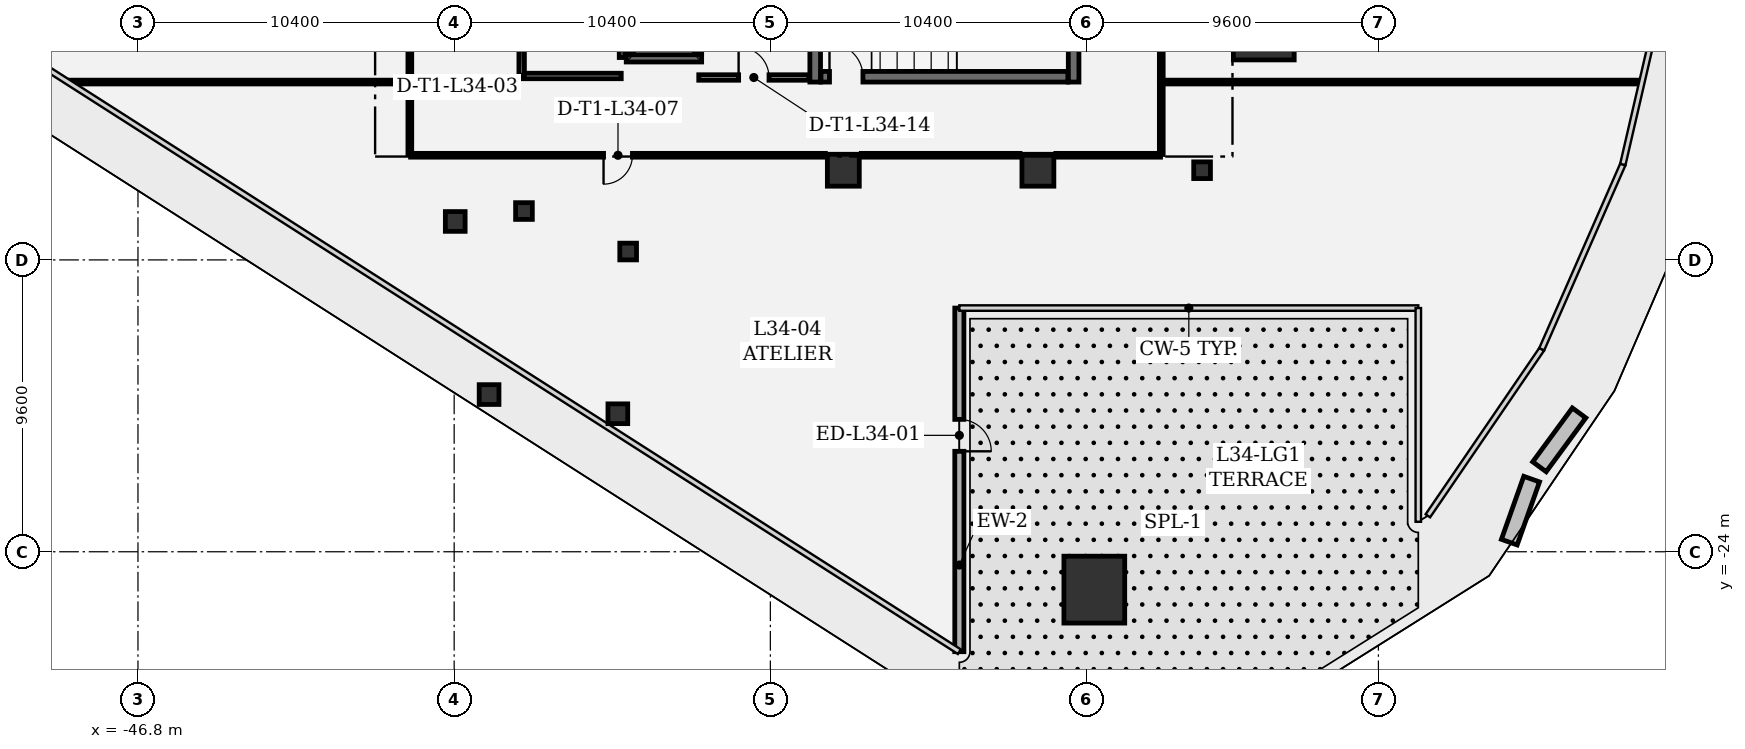
"""IFC4 building model, lengths in metres.
Left out: names, types, materials, properties, quantities, classifications, styles, units other than length and angle.
Written with IfcOpenShell. Run it as: python <this file> out.ifc"""

import sys

from ifc_helpers import new_model, si_unit, direction, frame, frame_2d, origin, origin_2d, place, context, subcontext, project, spatial, rectangle, extrude, element, fill, save


model = new_model("IFC4")
c1 = context("Model", 3, precision=1e-05, world=origin(), true_north=direction((0.0, 1.0)))
c2 = subcontext(c1, "Body", "Model", "MODEL_VIEW")
j1 = project(units=[si_unit("LENGTHUNIT", "METRE"), si_unit("PLANEANGLEUNIT", "RADIAN")], contexts=[c1])
p1 = place(None, origin())
s1 = spatial("IfcSite", under=j1, at=p1, CompositionType="ELEMENT")
p2 = place(p1, origin())
s2 = spatial("IfcBuilding", under=s1, at=p2, CompositionType="ELEMENT")
p3 = place(p2, frame((0.0, 0.0, 150.3)))
s3 = spatial("IfcBuildingStorey", under=s2, at=p3, CompositionType="ELEMENT", Elevation=150.3)
for number, where, z_axis, x_axis in (
    (1, (-15.344, -25.246, 0.0), (0.0, 0.0, 1.0), (1.0, 0.0, 0.0)),
    (2, (-9.77, -6.721, 0.0), (0.0, 0.0, 1.0), (1.0, 0.0, 0.0)),
):
    element("IfcColumn", number, at=place(p3, frame(where, z_axis=z_axis, x_axis=x_axis)), inside=s3, PredefinedType="COLUMN", context=c2, shape_type="SweptSolid", body=[
        extrude(rectangle(XDim=2.0, YDim=2.2, at=origin_2d()), origin(), (0.0, 0.0, 1.0), 4.05),
    ])
for number, where, z_axis, x_axis in (
    (3, (-17.2, -11.45, 0.0), (0.0, 0.0, 1.0), (1.0, 0.0, 0.0)),
    (4, (-23.6, -11.45, 0.0), (0.0, 0.0, 1.0), (1.0, 0.0, 0.0)),
):
    element("IfcColumn", number, at=place(p3, frame(where, z_axis=z_axis, x_axis=x_axis)), inside=s3, PredefinedType="COLUMN", context=c2, shape_type="SweptSolid", body=[
        extrude(rectangle(XDim=1.05, YDim=1.05, at=origin_2d()), origin(), (0.0, 0.0, 1.0), 4.05),
    ])
for number, where, z_axis, x_axis in (
    (5, (-35.252, -18.829, 0.0), (0.0, 0.0, 1.0), (1.0, 0.0, 0.0)),
    (6, (-31.016, -19.46, 0.0), (0.0, 0.0, 1.0), (1.0, 0.0, 0.0)),
    (7, (-36.365, -13.135, 0.0), (0.0, 0.0, 1.0), (1.0, 0.0, 0.0)),
):
    element("IfcColumn", number, at=place(p3, frame(where, z_axis=z_axis, x_axis=x_axis)), inside=s3, PredefinedType="COLUMN", context=c2, shape_type="SweptSolid", body=[
        extrude(rectangle(XDim=0.65, YDim=0.65, at=origin_2d()), origin(), (0.0, 0.0, 1.0), 4.05),
    ])
for number, where, z_axis, x_axis in (
    (8, (-34.104, -12.792, 0.0), (0.0, 0.0, 1.0), (1.0, 0.0, 0.0)),
    (9, (-30.677, -14.124, 0.0), (0.0, 0.0, 1.0), (1.0, 0.0, 0.0)),
    (10, (-11.8, -11.45, 0.0), (0.0, 0.0, 1.0), (1.0, 0.0, 0.0)),
):
    element("IfcColumn", number, at=place(p3, frame(where, z_axis=z_axis, x_axis=x_axis)), inside=s3, PredefinedType="COLUMN", context=c2, shape_type="SweptSolid", body=[
        extrude(rectangle(XDim=0.55, YDim=0.55, at=origin_2d()), origin(), (0.0, 0.0, 1.0), 4.05),
    ])
p4 = place(p3, frame((-19.784, -15.984, 0.0), z_axis=(0.0, 0.0, 1.0), x_axis=(0.0, -1.0, 0.0)))
e11 = element("IfcWall", 11, at=p4, inside=s3, PredefinedType="SOLIDWALL", context=c2, shape_type="SweptSolid", body=[
    extrude(rectangle(XDim=11.303, YDim=0.3, at=frame_2d((5.652, 0.0))), origin(), (0.0, 0.0, 1.0), 2.895),
])
p5 = place(p4, frame((3.662, 0.0, 0.0)))
e12 = element("IfcOpeningElement", 12, at=p5, cuts=e11, PredefinedType="OPENING", context=c2, shape_type="SweptSolid", body=[
    extrude(rectangle(XDim=1.05, YDim=2.2, at=frame_2d((0.525, 1.1))), frame((0.0, 0.16, 0.0), z_axis=(0.0, -1.0, 0.0), x_axis=(1.0, 0.0, 0.0)), (0.0, 0.0, 1.0), 0.32),
])
for number, where, z_axis, x_axis in (
    (13, (-24.525, -4.34, 0.0), (0.0, 0.0, 1.0), (0.0, -1.0, 0.0)),
    (14, (-16.025, -8.55, 0.0), (0.0, 0.0, 1.0), (0.0, 1.0, 0.0)),
):
    element("IfcWall", number, at=place(p3, frame(where, z_axis=z_axis, x_axis=x_axis)), inside=s3, PredefinedType="SHEAR", context=c2, shape_type="SweptSolid", body=[
        extrude(rectangle(XDim=4.21, YDim=0.35, at=frame_2d((2.105, 0.0))), origin(), (0.0, 0.0, 1.0), 3.78),
    ])
p6 = place(p3, frame((-24.335, -8.375, 0.0), z_axis=(0.0, 0.0, 1.0), x_axis=(1.0, 0.0, 0.0)))
e15 = element("IfcWall", 15, at=p6, inside=s3, PredefinedType="SHEAR", context=c2, shape_type="SweptSolid", body=[
    extrude(rectangle(XDim=8.12, YDim=0.35, at=frame_2d((4.06, 0.0))), origin(), (0.0, 0.0, 1.0), 3.78),
])
p7 = place(p6, frame((0.28, 0.0, 0.0)))
e16 = element("IfcOpeningElement", 16, at=p7, cuts=e15, PredefinedType="OPENING", context=c2, shape_type="SweptSolid", body=[
    extrude(rectangle(XDim=1.1, YDim=2.2, at=frame_2d((0.55, 1.1))), frame((0.0, 0.185, 0.0), z_axis=(0.0, -1.0, 0.0), x_axis=(1.0, 0.0, 0.0)), (0.0, 0.0, 1.0), 0.37),
])
p8 = place(p3, frame((-28.26, -7.77, 0.0), z_axis=(0.0, 0.0, 1.0), x_axis=(-1.0, 0.0, 0.0)))
e17 = element("IfcWall", 17, at=p8, inside=s3, PredefinedType="SHEAR", context=c2, shape_type="SweptSolid", body=[
    extrude(rectangle(XDim=2.48, YDim=0.24, at=frame_2d((1.24, 0.0))), origin(), (0.0, 0.0, 1.0), 3.78),
])
p9 = place(p3, frame((-30.62, -7.638, 0.0), z_axis=(0.0, 0.0, 1.0), x_axis=(0.0, 1.0, 0.0)))
e18 = element("IfcWall", 18, at=p9, inside=s3, PredefinedType="SHEAR", context=c2, shape_type="SweptSolid", body=[
    extrude(rectangle(XDim=2.376, YDim=0.24, at=frame_2d((1.188, 0.0))), origin(), (0.0, 0.0, 1.0), 3.78),
])
p10 = place(p3, frame((-28.38, -5.262, 0.0), z_axis=(0.0, 0.0, 1.0), x_axis=(0.0, -1.0, 0.0)))
e19 = element("IfcWall", 19, at=p10, inside=s3, PredefinedType="SHEAR", context=c2, shape_type="SweptSolid", body=[
    extrude(rectangle(XDim=2.376, YDim=0.24, at=frame_2d((1.188, 0.0))), origin(), (0.0, 0.0, 1.0), 3.78),
])
p11 = place(p10, frame((0.538, 0.0, 0.0)))
e20 = element("IfcOpeningElement", 20, at=p11, cuts=e19, PredefinedType="OPENING", context=c2, shape_type="SweptSolid", body=[
    extrude(rectangle(XDim=1.3, YDim=2.3, at=frame_2d((0.65, 1.15))), frame((0.0, 0.13, 0.0), z_axis=(0.0, -1.0, 0.0), x_axis=(1.0, 0.0, 0.0)), (0.0, 0.0, 1.0), 0.26),
])
p12 = place(p3, frame((-28.355, -8.4, 0.0), z_axis=(0.0, 0.0, 1.0), x_axis=(1.0, 0.0, 0.0)))
e21 = element("IfcWall", 21, at=p12, inside=s3, PredefinedType="PARTITIONING", context=c2, shape_type="SweptSolid", body=[
    extrude(rectangle(XDim=3.622, YDim=0.18, at=frame_2d((1.811, 0.0))), origin(), (0.0, 0.0, 1.0), 3.78),
])
p13 = place(p12, frame((1.311, 0.0, 0.0)))
e22 = element("IfcOpeningElement", 22, at=p13, cuts=e21, PredefinedType="OPENING", context=c2, shape_type="SweptSolid", body=[
    extrude(rectangle(XDim=1.0, YDim=2.15, at=frame_2d((0.5, 1.075))), frame((0.0, 0.1, 0.0), z_axis=(0.0, -1.0, 0.0), x_axis=(1.0, 0.0, 0.0)), (0.0, 0.0, 1.0), 0.2),
])
p14 = place(p3, frame((-34.155, -8.35, 0.0), z_axis=(0.0, 0.0, 1.0), x_axis=(1.0, 0.0, 0.0)))
e23 = element("IfcWall", 23, at=p14, inside=s3, PredefinedType="PARTITIONING", context=c2, shape_type="SweptSolid", body=[
    extrude(rectangle(XDim=3.25, YDim=0.18, at=frame_2d((1.625, 0.0))), origin(), (0.0, 0.0, 1.0), 3.78),
])
p15 = place(p3, frame((-30.88, -7.743, 0.0), z_axis=(0.0, 0.0, 1.0), x_axis=(0.0, 1.0, 0.0)))
e24 = element("IfcWall", 24, at=p15, inside=s3, PredefinedType="PARTITIONING", context=c2, shape_type="SweptSolid", body=[
    extrude(rectangle(XDim=2.003, YDim=0.18, at=frame_2d((1.001, 0.0))), origin(), (0.0, 0.0, 1.0), 3.78),
])
p16 = place(p3, frame((-34.18, -4.84, 0.0), z_axis=(0.0, 0.0, 1.0), x_axis=(0.0, -1.0, 0.0)))
e25 = element("IfcWall", 25, at=p16, inside=s3, PredefinedType="PARTITIONING", context=c2, shape_type="SweptSolid", body=[
    extrude(rectangle(XDim=3.485, YDim=0.18, at=frame_2d((1.743, 0.0))), origin(), (0.0, 0.0, 1.0), 3.78),
])
p17 = place(p16, frame((1.302, 0.0, 0.0)))
e26 = element("IfcOpeningElement", 26, at=p17, cuts=e25, PredefinedType="OPENING", context=c2, shape_type="SweptSolid", body=[
    extrude(rectangle(XDim=0.88, YDim=2.1, at=frame_2d((0.44, 1.05))), frame((0.0, 0.1, 0.0), z_axis=(0.0, -1.0, 0.0), x_axis=(1.0, 0.0, 0.0)), (0.0, 0.0, 1.0), 0.2),
])
p18 = place(p3, frame((2.587, -8.55, 0.0), z_axis=(0.0, 0.0, 1.0), x_axis=(-1.0, 0.0, 0.0)))
e27 = element("IfcWall", 27, at=p18, inside=s3, PredefinedType="PARTITIONING", context=c2, shape_type="SweptSolid", body=[
    extrude(rectangle(XDim=15.704, YDim=0.125, at=frame_2d((7.852, 0.0))), origin(), (0.0, 0.0, 1.0), 2.895),
])
p19 = place(p3, frame((-13.142, -10.933, 0.0), z_axis=(0.0, 0.0, 1.0), x_axis=(0.0, 1.0, 0.0)))
e28 = element("IfcWall", 28, at=p19, inside=s3, PredefinedType="PARTITIONING", context=c2, shape_type="SweptSolid", body=[
    extrude(rectangle(XDim=2.358, YDim=0.125, at=frame_2d((1.179, 0.0))), origin(), (0.0, 0.0, 1.0), 3.78),
])
p20 = place(p3, frame((-13.167, -10.958, 0.0), z_axis=(0.0, 0.0, 1.0), x_axis=(-1.0, 0.0, 0.0)))
e29 = element("IfcWall", 29, at=p20, inside=s3, PredefinedType="PARTITIONING", context=c2, shape_type="SweptSolid", body=[
    extrude(rectangle(XDim=3.443, YDim=0.125, at=frame_2d((1.722, 0.0))), origin(), (0.0, 0.0, 1.0), 2.895),
])
p21 = place(p3, frame((-17.79, -10.958, 0.0), z_axis=(0.0, 0.0, 1.0), x_axis=(-1.0, 0.0, 0.0)))
e30 = element("IfcWall", 30, at=p21, inside=s3, PredefinedType="PARTITIONING", context=c2, shape_type="SweptSolid", body=[
    extrude(rectangle(XDim=5.22, YDim=0.125, at=frame_2d((2.61, 0.0))), origin(), (0.0, 0.0, 1.0), 3.78),
])
p22 = place(p3, frame((-24.19, -10.958, 0.0), z_axis=(0.0, 0.0, 1.0), x_axis=(-1.0, 0.0, 0.0)))
e31 = element("IfcWall", 31, at=p22, inside=s3, PredefinedType="PARTITIONING", context=c2, shape_type="SweptSolid", body=[
    extrude(rectangle(XDim=13.643, YDim=0.125, at=frame_2d((6.822, 0.0))), origin(), (0.0, 0.0, 1.0), 3.344),
])
p23 = place(p22, frame((6.346, 0.0, 0.0)))
e32 = element("IfcOpeningElement", 32, at=p23, cuts=e31, PredefinedType="OPENING", context=c2, shape_type="SweptSolid", body=[
    extrude(rectangle(XDim=0.95, YDim=2.15, at=frame_2d((0.475, 1.075))), frame((0.0, 0.073, 0.0), z_axis=(0.0, -1.0, 0.0), x_axis=(1.0, 0.0, 0.0)), (0.0, 0.0, 1.0), 0.145),
])
p24 = place(p3, frame((-37.858, -8.575, 0.0), z_axis=(0.0, 0.0, 1.0), x_axis=(0.0, -1.0, 0.0)))
e33 = element("IfcWall", 33, at=p24, inside=s3, PredefinedType="PARTITIONING", context=c2, shape_type="SweptSolid", body=[
    extrude(rectangle(XDim=2.358, YDim=0.125, at=frame_2d((1.179, 0.0))), origin(), (0.0, 0.0, 1.0), 3.78),
])
p25 = place(p3, frame((-37.883, -8.55, 0.0), z_axis=(0.0, 0.0, 1.0), x_axis=(-1.0, 0.0, 0.0)))
e34 = element("IfcWall", 34, at=p25, inside=s3, PredefinedType="PARTITIONING", context=c2, shape_type="SweptSolid", body=[
    extrude(rectangle(XDim=11.137, YDim=0.125, at=frame_2d((5.569, 0.0))), origin(), (0.0, 0.0, 1.0), 2.9),
])
p26 = place(p3, frame((-13.142, -3.644, 0.0), z_axis=(0.0, 0.0, 1.0), x_axis=(0.0, -1.0, 0.0)))
e35 = element("IfcWall", 35, at=p26, inside=s3, PredefinedType="PARTITIONING", context=c2, shape_type="SweptSolid", body=[
    extrude(rectangle(XDim=4.873, YDim=0.125, at=frame_2d((2.437, 0.0))), origin(), (0.0, 0.0, 1.0), 3.78),
])
p27 = place(p26, frame((1.962, 0.0, 0.0)))
e36 = element("IfcOpeningElement", 36, at=p27, cuts=e35, PredefinedType="OPENING", context=c2, shape_type="SweptSolid", body=[
    extrude(rectangle(XDim=0.95, YDim=2.15, at=frame_2d((0.475, 1.075))), frame((0.0, 0.073, 0.0), z_axis=(0.0, -1.0, 0.0), x_axis=(1.0, 0.0, 0.0)), (0.0, 0.0, 1.0), 0.145),
])
p28 = place(p3, frame((-37.858, -8.517, 0.0), z_axis=(0.0, 0.0, 1.0), x_axis=(0.0, 1.0, 0.0)))
e37 = element("IfcWall", 37, at=p28, inside=s3, PredefinedType="PARTITIONING", context=c2, shape_type="SweptSolid", body=[
    extrude(rectangle(XDim=3.734, YDim=0.125, at=frame_2d((1.867, 0.0))), origin(), (0.0, 0.0, 1.0), 3.78),
])
p29 = place(p28, frame((1.392, 0.0, 0.0)))
e38 = element("IfcOpeningElement", 38, at=p29, cuts=e37, PredefinedType="OPENING", context=c2, shape_type="SweptSolid", body=[
    extrude(rectangle(XDim=0.95, YDim=2.15, at=frame_2d((0.475, 1.075))), frame((0.0, 0.073, 0.0), z_axis=(0.0, -1.0, 0.0), x_axis=(1.0, 0.0, 0.0)), (0.0, 0.0, 1.0), 0.145),
])
p30 = place(p5, origin())
e39 = element("IfcDoor", 39, at=p30, inside=s3, OperationType="SINGLE_SWING_RIGHT", PredefinedType="DOOR", context=c2, shape_type="SweptSolid", body=[
    extrude(rectangle(XDim=1.05, YDim=2.2, at=frame_2d((0.525, 1.1))), frame((0.0, 0.025, 0.0), z_axis=(0.0, -1.0, 0.0), x_axis=(1.0, 0.0, 0.0)), (0.0, 0.0, 1.0), 0.05),
])
fill(e12, e39)
p31 = place(p7, origin())
e40 = element("IfcDoor", 40, at=p31, inside=s3, OperationType="SINGLE_SWING_LEFT", PredefinedType="DOOR", context=c2, shape_type="SweptSolid", body=[
    extrude(rectangle(XDim=1.1, YDim=2.2, at=frame_2d((0.55, 1.1))), frame((0.0, 0.025, 0.0), z_axis=(0.0, -1.0, 0.0), x_axis=(1.0, 0.0, 0.0)), (0.0, 0.0, 1.0), 0.05),
])
fill(e16, e40)
p32 = place(p23, origin())
e41 = element("IfcDoor", 41, at=p32, inside=s3, OperationType="SINGLE_SWING_RIGHT", PredefinedType="DOOR", context=c2, shape_type="SweptSolid", body=[
    extrude(rectangle(XDim=0.95, YDim=2.15, at=frame_2d((0.475, 1.075))), frame((0.0, 0.025, 0.0), z_axis=(0.0, -1.0, 0.0), x_axis=(1.0, 0.0, 0.0)), (0.0, 0.0, 1.0), 0.05),
])
fill(e32, e41)
p33 = place(p13, origin())
e42 = element("IfcDoor", 42, at=p33, inside=s3, OperationType="SINGLE_SWING_LEFT", PredefinedType="DOOR", context=c2, shape_type="SweptSolid", body=[
    extrude(rectangle(XDim=1.0, YDim=2.15, at=frame_2d((0.5, 1.075))), frame((0.0, 0.025, 0.0), z_axis=(0.0, -1.0, 0.0), x_axis=(1.0, 0.0, 0.0)), (0.0, 0.0, 1.0), 0.05),
])
fill(e22, e42)
save(model, sys.argv[1])
